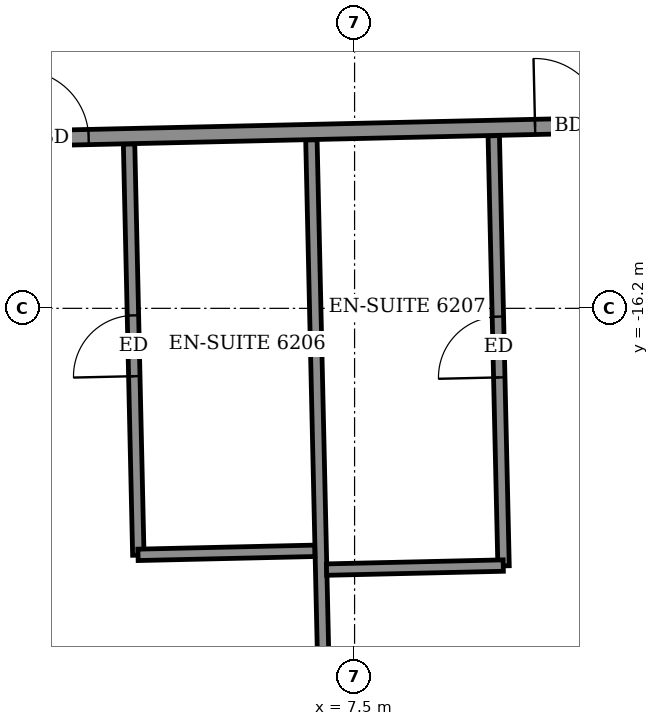
"""IFC4 building model, lengths in metres.
Left out: names, types, materials, properties, quantities, classifications, styles, units other than length and angle.
Written with IfcOpenShell. Run it as: python <this file> out.ifc"""

import sys

from ifc_helpers import new_model, si_unit, direction, frame, frame_2d, origin, place, context, subcontext, project, spatial, rectangle, extrude, element, fill, save


model = new_model("IFC4")
c1 = context("Model", 3, precision=1e-05, world=origin(), true_north=direction((0.0, 1.0)))
c2 = subcontext(c1, "Body", "Model", "MODEL_VIEW")
j1 = project(units=[si_unit("LENGTHUNIT", "METRE"), si_unit("PLANEANGLEUNIT", "RADIAN")], contexts=[c1])
p1 = place(None, origin())
s1 = spatial("IfcSite", under=j1, at=p1, CompositionType="ELEMENT")
p2 = place(p1, origin())
s2 = spatial("IfcBuilding", under=s1, at=p2, CompositionType="ELEMENT")
p3 = place(p2, frame((0.0, 0.0, 245.5)))
s3 = spatial("IfcBuildingStorey", under=s2, at=p3, CompositionType="ELEMENT", Elevation=245.5)
p4 = place(p3, frame((7.19, -25.357, 0.0), z_axis=(0.0, 0.0, 1.0), x_axis=(-0.022684355347, 0.999742676904, 0.0)))
e1 = element("IfcWall", 1, at=p4, inside=s3, PredefinedType="PARTITIONING", context=c2, shape_type="SweptSolid", body=[
    extrude(rectangle(XDim=11.376, YDim=0.15, at=frame_2d((5.688, 0.0))), origin(), (0.0, 0.0, 1.0), 2.5),
])
p5 = place(p3, frame((9.46, -19.588, 0.0), z_axis=(0.0, 0.0, 1.0), x_axis=(-0.022773332125, 0.999740654042, 0.0)))
e2 = element("IfcWall", 2, at=p5, inside=s3, PredefinedType="PARTITIONING", context=c2, shape_type="SweptSolid", body=[
    extrude(rectangle(XDim=5.66, YDim=0.15, at=frame_2d((2.83, 0.0))), origin(), (0.0, 0.0, 1.0), 3.05),
])
p6 = place(p5, frame((2.48, 0.0, 0.0)))
e3 = element("IfcOpeningElement", 3, at=p6, cuts=e2, PredefinedType="OPENING", context=c2, shape_type="SweptSolid", body=[
    extrude(rectangle(XDim=0.8, YDim=2.1, at=frame_2d((0.4, 1.05))), frame((0.0, 0.085, 0.0), z_axis=(0.0, -1.0, 0.0), x_axis=(1.0, 0.0, 0.0)), (0.0, 0.0, 1.0), 0.17),
])
p7 = place(p3, frame((7.131, -19.637, 0.0), z_axis=(0.0, 0.0, 1.0), x_axis=(0.999740478815, 0.022781023197, 0.0)))
e4 = element("IfcWall", 4, at=p7, inside=s3, PredefinedType="PARTITIONING", context=c2, shape_type="SweptSolid", body=[
    extrude(rectangle(XDim=2.325, YDim=0.15, at=frame_2d((1.163, 0.0))), origin(), (0.0, 0.0, 1.0), 3.05),
])
p8 = place(p3, frame((4.655, -19.447, 0.0), z_axis=(0.0, 0.0, 1.0), x_axis=(-0.022562523897, 0.999745433856, 0.0)))
e5 = element("IfcWall", 5, at=p8, inside=s3, PredefinedType="PARTITIONING", context=c2, shape_type="SweptSolid", body=[
    extrude(rectangle(XDim=5.41, YDim=0.15, at=frame_2d((2.705, 0.0))), origin(), (0.0, 0.0, 1.0), 3.05),
])
p9 = place(p8, frame((2.355, 0.0, 0.0)))
e6 = element("IfcOpeningElement", 6, at=p9, cuts=e5, PredefinedType="OPENING", context=c2, shape_type="SweptSolid", body=[
    extrude(rectangle(XDim=0.8, YDim=2.1, at=frame_2d((0.4, 1.05))), frame((0.0, 0.085, 0.0), z_axis=(0.0, -1.0, 0.0), x_axis=(1.0, 0.0, 0.0)), (0.0, 0.0, 1.0), 0.17),
])
p10 = place(p3, frame((4.651, -19.443, 0.0), z_axis=(0.0, 0.0, 1.0), x_axis=(0.999738137323, 0.022883548292, 0.0)))
e7 = element("IfcWall", 7, at=p10, inside=s3, PredefinedType="PARTITIONING", context=c2, shape_type="SweptSolid", body=[
    extrude(rectangle(XDim=2.326, YDim=0.15, at=frame_2d((1.163, 0.0))), origin(), (0.0, 0.0, 1.0), 3.05),
])
p11 = place(p3, frame((-27.016, -14.65, 0.0), z_axis=(0.0, 0.0, 1.0), x_axis=(0.999742874861, 0.022675629315, 0.0)))
e8 = element("IfcWall", 8, at=p11, inside=s3, PredefinedType="PARTITIONING", context=c2, shape_type="SweptSolid", body=[
    extrude(rectangle(XDim=50.883, YDim=0.2, at=frame_2d((25.442, 0.0))), origin(), (0.0, 0.0, 1.0), 3.05),
])
p12 = place(p11, frame((1.575, 0.0, 0.0)))
e9 = element("IfcOpeningElement", 9, at=p12, cuts=e8, PredefinedType="OPENING", context=c2, shape_type="SweptSolid", body=[
    extrude(rectangle(XDim=1.0, YDim=2.1, at=frame_2d((0.5, 1.05))), frame((0.0, 0.11, 0.0), z_axis=(0.0, -1.0, 0.0), x_axis=(1.0, 0.0, 0.0)), (0.0, 0.0, 1.0), 0.22),
])
p13 = place(p11, frame((6.4, 0.0, 0.0)))
e10 = element("IfcOpeningElement", 10, at=p13, cuts=e8, PredefinedType="OPENING", context=c2, shape_type="SweptSolid", body=[
    extrude(rectangle(XDim=0.9, YDim=2.1, at=frame_2d((0.45, 1.05))), frame((0.0, 0.11, 0.0), z_axis=(0.0, -1.0, 0.0), x_axis=(1.0, 0.0, 0.0)), (0.0, 0.0, 1.0), 0.22),
])
p14 = place(p11, frame((11.025, 0.0, 0.0)))
e11 = element("IfcOpeningElement", 11, at=p14, cuts=e8, PredefinedType="OPENING", context=c2, shape_type="SweptSolid", body=[
    extrude(rectangle(XDim=0.9, YDim=2.1, at=frame_2d((0.45, 1.05))), frame((0.0, 0.11, 0.0), z_axis=(0.0, -1.0, 0.0), x_axis=(1.0, 0.0, 0.0)), (0.0, 0.0, 1.0), 0.22),
])
p15 = place(p11, frame((12.925, 0.0, 0.0)))
e12 = element("IfcOpeningElement", 12, at=p15, cuts=e8, PredefinedType="OPENING", context=c2, shape_type="SweptSolid", body=[
    extrude(rectangle(XDim=0.9, YDim=2.1, at=frame_2d((0.45, 1.05))), frame((0.0, 0.11, 0.0), z_axis=(0.0, -1.0, 0.0), x_axis=(1.0, 0.0, 0.0)), (0.0, 0.0, 1.0), 0.22),
])
p16 = place(p11, frame((19.65, 0.0, 0.0)))
e13 = element("IfcOpeningElement", 13, at=p16, cuts=e8, PredefinedType="OPENING", context=c2, shape_type="SweptSolid", body=[
    extrude(rectangle(XDim=0.9, YDim=2.1, at=frame_2d((0.45, 1.05))), frame((0.0, 0.11, 0.0), z_axis=(0.0, -1.0, 0.0), x_axis=(1.0, 0.0, 0.0)), (0.0, 0.0, 1.0), 0.22),
])
p17 = place(p11, frame((21.575, 0.0, 0.0)))
e14 = element("IfcOpeningElement", 14, at=p17, cuts=e8, PredefinedType="OPENING", context=c2, shape_type="SweptSolid", body=[
    extrude(rectangle(XDim=0.9, YDim=2.1, at=frame_2d((0.45, 1.05))), frame((0.0, 0.11, 0.0), z_axis=(0.0, -1.0, 0.0), x_axis=(1.0, 0.0, 0.0)), (0.0, 0.0, 1.0), 0.22),
])
p18 = place(p11, frame((28.25, 0.0, 0.0)))
e15 = element("IfcOpeningElement", 15, at=p18, cuts=e8, PredefinedType="OPENING", context=c2, shape_type="SweptSolid", body=[
    extrude(rectangle(XDim=0.9, YDim=2.1, at=frame_2d((0.45, 1.05))), frame((0.0, 0.11, 0.0), z_axis=(0.0, -1.0, 0.0), x_axis=(1.0, 0.0, 0.0)), (0.0, 0.0, 1.0), 0.22),
])
p19 = place(p11, frame((30.125, 0.0, 0.0)))
e16 = element("IfcOpeningElement", 16, at=p19, cuts=e8, PredefinedType="OPENING", context=c2, shape_type="SweptSolid", body=[
    extrude(rectangle(XDim=0.9, YDim=2.1, at=frame_2d((0.45, 1.05))), frame((0.0, 0.11, 0.0), z_axis=(0.0, -1.0, 0.0), x_axis=(1.0, 0.0, 0.0)), (0.0, 0.0, 1.0), 0.22),
])
p20 = place(p11, frame((36.9, 0.0, 0.0)))
e17 = element("IfcOpeningElement", 17, at=p20, cuts=e8, PredefinedType="OPENING", context=c2, shape_type="SweptSolid", body=[
    extrude(rectangle(XDim=0.9, YDim=2.1, at=frame_2d((0.45, 1.05))), frame((0.0, 0.11, 0.0), z_axis=(0.0, -1.0, 0.0), x_axis=(1.0, 0.0, 0.0)), (0.0, 0.0, 1.0), 0.22),
])
p21 = place(p11, frame((38.85, 0.0, 0.0)))
e18 = element("IfcOpeningElement", 18, at=p21, cuts=e8, PredefinedType="OPENING", context=c2, shape_type="SweptSolid", body=[
    extrude(rectangle(XDim=0.9, YDim=2.1, at=frame_2d((0.45, 1.05))), frame((0.0, 0.11, 0.0), z_axis=(0.0, -1.0, 0.0), x_axis=(1.0, 0.0, 0.0)), (0.0, 0.0, 1.0), 0.22),
])
p22 = place(p11, frame((48.629, 0.0, 0.0)))
e19 = element("IfcOpeningElement", 19, at=p22, cuts=e8, PredefinedType="OPENING", context=c2, shape_type="SweptSolid", body=[
    extrude(rectangle(XDim=1.0, YDim=2.1, at=frame_2d((0.5, 1.05))), frame((0.0, 0.11, 0.0), z_axis=(0.0, -1.0, 0.0), x_axis=(1.0, 0.0, 0.0)), (0.0, 0.0, 1.0), 0.22),
])
p23 = place(p11, frame((43.6, 0.0, 0.0)))
e20 = element("IfcOpeningElement", 20, at=p23, cuts=e8, PredefinedType="OPENING", context=c2, shape_type="SweptSolid", body=[
    extrude(rectangle(XDim=0.9, YDim=2.1, at=frame_2d((0.45, 1.05))), frame((0.0, 0.11, 0.0), z_axis=(0.0, -1.0, 0.0), x_axis=(1.0, 0.0, 0.0)), (0.0, 0.0, 1.0), 0.22),
])
p24 = place(p19, origin())
e21 = element("IfcDoor", 21, at=p24, inside=s3, OperationType="SINGLE_SWING_RIGHT", PredefinedType="DOOR", context=c2, shape_type="SweptSolid", body=[
    extrude(rectangle(XDim=0.9, YDim=2.1, at=frame_2d((0.45, 1.05))), frame((0.0, 0.025, 0.0), z_axis=(0.0, -1.0, 0.0), x_axis=(1.0, 0.0, 0.0)), (0.0, 0.0, 1.0), 0.05),
])
fill(e16, e21)
p25 = place(p9, origin())
e22 = element("IfcDoor", 22, at=p25, inside=s3, OperationType="SINGLE_SWING_RIGHT", PredefinedType="DOOR", context=c2, shape_type="SweptSolid", body=[
    extrude(rectangle(XDim=0.8, YDim=2.1, at=frame_2d((0.4, 1.05))), frame((0.0, 0.025, 0.0), z_axis=(0.0, -1.0, 0.0), x_axis=(1.0, 0.0, 0.0)), (0.0, 0.0, 1.0), 0.05),
])
fill(e6, e22)
p26 = place(p20, origin())
e23 = element("IfcDoor", 23, at=p26, inside=s3, OperationType="SINGLE_SWING_LEFT", PredefinedType="DOOR", context=c2, shape_type="SweptSolid", body=[
    extrude(rectangle(XDim=0.9, YDim=2.1, at=frame_2d((0.45, 1.05))), frame((0.0, 0.025, 0.0), z_axis=(0.0, -1.0, 0.0), x_axis=(1.0, 0.0, 0.0)), (0.0, 0.0, 1.0), 0.05),
])
fill(e17, e23)
p27 = place(p6, origin())
e24 = element("IfcDoor", 24, at=p27, inside=s3, OperationType="SINGLE_SWING_LEFT", PredefinedType="DOOR", context=c2, shape_type="SweptSolid", body=[
    extrude(rectangle(XDim=0.8, YDim=2.1, at=frame_2d((0.4, 1.05))), frame((0.0, 0.025, 0.0), z_axis=(0.0, -1.0, 0.0), x_axis=(1.0, 0.0, 0.0)), (0.0, 0.0, 1.0), 0.05),
])
fill(e3, e24)
save(model, sys.argv[1])
